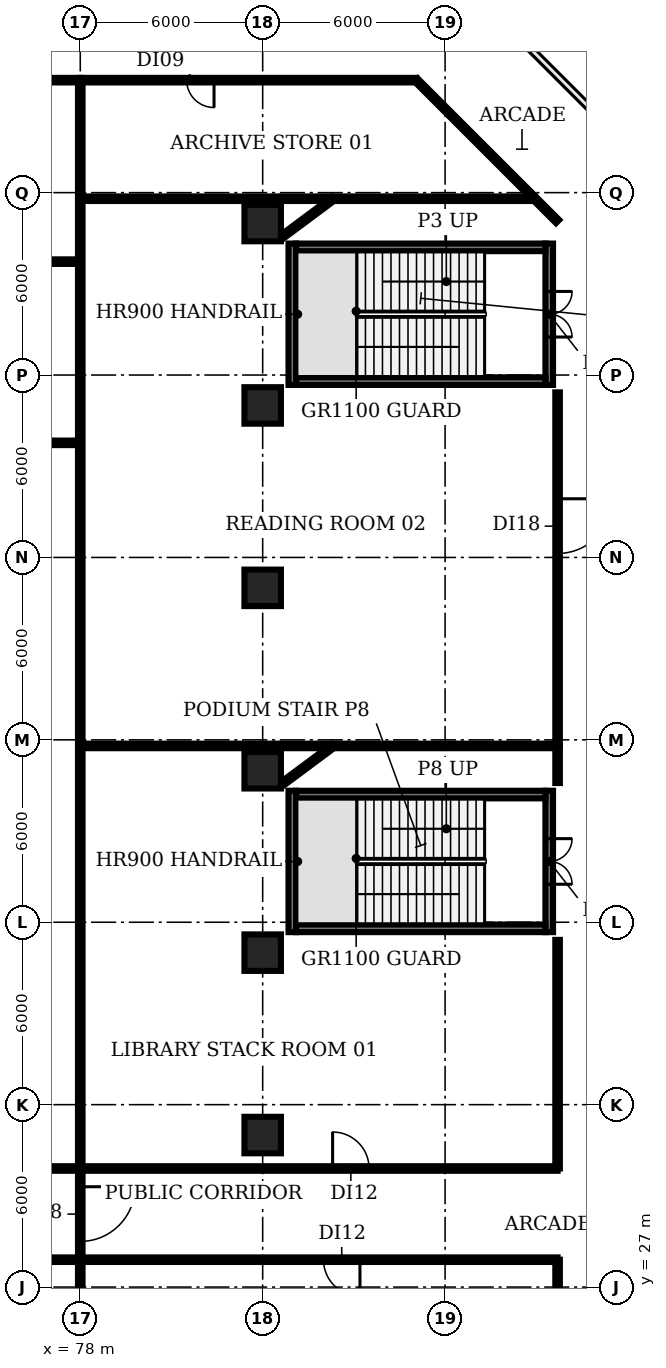
"""IFC4 building model, lengths in metres.
Left out: names, types, materials, properties, quantities, classifications, styles, units other than length and angle.
Written with IfcOpenShell. Run it as: python <this file> out.ifc"""

import sys

from ifc_helpers import new_model, si_unit, direction, frame, frame_2d, origin, origin_2d, place, context, subcontext, project, spatial, rectangle, extrude, element, fill, save


model = new_model("IFC4")
c1 = context("Model", 3, precision=1e-05, world=origin(), true_north=direction((0.0, 1.0)))
c2 = subcontext(c1, "Body", "Model", "MODEL_VIEW")
j1 = project(units=[si_unit("LENGTHUNIT", "METRE"), si_unit("PLANEANGLEUNIT", "RADIAN")], contexts=[c1])
p1 = place(None, origin())
s1 = spatial("IfcSite", under=j1, at=p1, CompositionType="ELEMENT")
p2 = place(p1, origin())
s2 = spatial("IfcBuilding", under=s1, at=p2, CompositionType="ELEMENT")
p3 = place(p2, origin())
s3 = spatial("IfcBuildingStorey", under=s2, at=p3, CompositionType="ELEMENT", Elevation=0.0)
for number, where, z_axis, x_axis in (
    (1, (84.0, 32.0, 0.0), (0.0, 0.0, 1.0), (1.0, 0.0, 0.0)),
    (2, (84.0, 38.0, 0.0), (0.0, 0.0, 1.0), (1.0, 0.0, 0.0)),
    (3, (84.0, 44.0, 0.0), (0.0, 0.0, 1.0), (1.0, 0.0, 0.0)),
    (4, (84.0, 50.0, 0.0), (0.0, 0.0, 1.0), (1.0, 0.0, 0.0)),
    (5, (84.0, 56.0, 0.0), (0.0, 0.0, 1.0), (1.0, 0.0, 0.0)),
    (6, (84.0, 62.0, 0.0), (0.0, 0.0, 1.0), (1.0, 0.0, 0.0)),
):
    element("IfcColumn", number, at=place(p3, frame(where, z_axis=z_axis, x_axis=x_axis)), inside=s3, PredefinedType="COLUMN", context=c2, shape_type="SweptSolid", body=[
        extrude(rectangle(XDim=1.2, YDim=1.2, at=origin_2d()), origin(), (0.0, 0.0, 1.0), 5.65),
    ])
p4 = place(p3, frame((84.975, 56.675, 0.0), z_axis=(0.0, 0.0, 1.0), x_axis=(0.0, 1.0, 0.0)))
e7 = element("IfcWall", 7, at=p4, inside=s3, PredefinedType="SHEAR", context=c2, shape_type="SweptSolid", body=[
    extrude(rectangle(XDim=4.65, YDim=0.25, at=frame_2d((2.325, 0.0))), origin(), (0.0, 0.0, 1.0), 5.65),
])
p5 = place(p3, frame((93.425, 61.325, 0.0), z_axis=(0.0, 0.0, 1.0), x_axis=(0.0, -1.0, 0.0)))
e8 = element("IfcWall", 8, at=p5, inside=s3, PredefinedType="SHEAR", context=c2, shape_type="SweptSolid", body=[
    extrude(rectangle(XDim=4.65, YDim=0.25, at=frame_2d((2.325, 0.0))), origin(), (0.0, 0.0, 1.0), 5.65),
])
p6 = place(p5, frame((1.575, 0.0, 0.0)))
e9 = element("IfcOpeningElement", 9, at=p6, cuts=e8, PredefinedType="OPENING", context=c2, shape_type="SweptSolid", body=[
    extrude(rectangle(XDim=1.5, YDim=2.1, at=frame_2d((0.75, 1.05))), frame((0.0, 0.135, 0.0), z_axis=(0.0, -1.0, 0.0), x_axis=(1.0, 0.0, 0.0)), (0.0, 0.0, 1.0), 0.27),
])
for number, where, z_axis, x_axis in (
    (10, (85.1, 56.8, 0.0), (0.0, 0.0, 1.0), (1.0, 0.0, 0.0)),
    (11, (85.1, 61.2, 0.0), (0.0, 0.0, 1.0), (1.0, 0.0, 0.0)),
):
    element("IfcWall", number, at=place(p3, frame(where, z_axis=z_axis, x_axis=x_axis)), inside=s3, PredefinedType="SHEAR", context=c2, shape_type="SweptSolid", body=[
        extrude(rectangle(XDim=8.2, YDim=0.25, at=frame_2d((4.1, 0.0))), origin(), (0.0, 0.0, 1.0), 5.65),
    ])
p7 = place(p3, frame((84.975, 38.675, 0.0), z_axis=(0.0, 0.0, 1.0), x_axis=(0.0, 1.0, 0.0)))
e12 = element("IfcWall", 12, at=p7, inside=s3, PredefinedType="SHEAR", context=c2, shape_type="SweptSolid", body=[
    extrude(rectangle(XDim=4.65, YDim=0.25, at=frame_2d((2.325, 0.0))), origin(), (0.0, 0.0, 1.0), 5.65),
])
p8 = place(p3, frame((93.425, 43.325, 0.0), z_axis=(0.0, 0.0, 1.0), x_axis=(0.0, -1.0, 0.0)))
e13 = element("IfcWall", 13, at=p8, inside=s3, PredefinedType="SHEAR", context=c2, shape_type="SweptSolid", body=[
    extrude(rectangle(XDim=4.65, YDim=0.25, at=frame_2d((2.325, 0.0))), origin(), (0.0, 0.0, 1.0), 5.65),
])
p9 = place(p8, frame((1.575, 0.0, 0.0)))
e14 = element("IfcOpeningElement", 14, at=p9, cuts=e13, PredefinedType="OPENING", context=c2, shape_type="SweptSolid", body=[
    extrude(rectangle(XDim=1.5, YDim=2.1, at=frame_2d((0.75, 1.05))), frame((0.0, 0.135, 0.0), z_axis=(0.0, -1.0, 0.0), x_axis=(1.0, 0.0, 0.0)), (0.0, 0.0, 1.0), 0.27),
])
for number, where, z_axis, x_axis in (
    (15, (85.1, 38.8, 0.0), (0.0, 0.0, 1.0), (1.0, 0.0, 0.0)),
    (16, (85.1, 43.2, 0.0), (0.0, 0.0, 1.0), (1.0, 0.0, 0.0)),
):
    element("IfcWall", number, at=place(p3, frame(where, z_axis=z_axis, x_axis=x_axis)), inside=s3, PredefinedType="SHEAR", context=c2, shape_type="SweptSolid", body=[
        extrude(rectangle(XDim=8.2, YDim=0.25, at=frame_2d((4.1, 0.0))), origin(), (0.0, 0.0, 1.0), 5.65),
    ])
for number, where, z_axis, x_axis in (
    (17, (67.8, 27.9, 0.0), (0.0, 0.0, 1.0), (1.0, 0.0, 0.0)),
    (18, (67.8, 30.9, 0.0), (0.0, 0.0, 1.0), (1.0, 0.0, 0.0)),
    (19, (67.8, 54.77, 0.0), (0.0, 0.0, 1.0), (1.0, 0.0, 0.0)),
    (20, (67.8, 60.73, 0.0), (0.0, 0.0, 1.0), (1.0, 0.0, 0.0)),
):
    element("IfcWall", number, at=place(p3, frame(where, z_axis=z_axis, x_axis=x_axis)), inside=s3, PredefinedType="PARTITIONING", context=c2, shape_type="SweptSolid", body=[
        extrude(rectangle(XDim=10.2, YDim=0.15, at=frame_2d((5.1, 0.0))), origin(), (0.0, 0.0, 1.0), 4.53),
    ])
p10 = place(p3, frame((78.0, -3.92, 0.0), z_axis=(0.0, 0.0, 1.0), x_axis=(0.0, 1.0, 0.0)))
e21 = element("IfcWall", 21, at=p10, inside=s3, PredefinedType="PARTITIONING", context=c2, shape_type="SweptSolid", body=[
    extrude(rectangle(XDim=31.82, YDim=0.15, at=frame_2d((15.91, 0.0))), origin(), (0.0, 0.0, 1.0), 4.53),
])
p11 = place(p3, frame((78.0, 30.9, 0.0), z_axis=(0.0, 0.0, 1.0), x_axis=(0.0, -1.0, 0.0)))
e22 = element("IfcWall", 22, at=p11, inside=s3, PredefinedType="PARTITIONING", context=c2, shape_type="SweptSolid", body=[
    extrude(rectangle(XDim=3.0, YDim=0.15, at=frame_2d((1.5, 0.0))), origin(), (0.0, 0.0, 1.0), 4.53),
])
p12 = place(p11, frame((0.6, 0.0, 0.0)))
e23 = element("IfcOpeningElement", 23, at=p12, cuts=e22, PredefinedType="OPENING", context=c2, shape_type="SweptSolid", body=[
    extrude(rectangle(XDim=1.8, YDim=2.1, at=frame_2d((0.9, 1.05))), frame((0.0, 0.085, 0.0), z_axis=(0.0, -1.0, 0.0), x_axis=(1.0, 0.0, 0.0)), (0.0, 0.0, 1.0), 0.17),
])
p13 = place(p3, frame((78.0, 30.9, 0.0), z_axis=(0.0, 0.0, 1.0), x_axis=(0.0, 1.0, 0.0)))
e24 = element("IfcWall", 24, at=p13, inside=s3, PredefinedType="PARTITIONING", context=c2, shape_type="SweptSolid", body=[
    extrude(rectangle(XDim=35.8, YDim=0.15, at=frame_2d((17.9, 0.0))), origin(), (0.0, 0.0, 1.0), 4.53),
])
p14 = place(p3, frame((78.0, 30.9, 0.0), z_axis=(0.0, 0.0, 1.0), x_axis=(1.0, 0.0, 0.0)))
e25 = element("IfcWall", 25, at=p14, inside=s3, PredefinedType="PARTITIONING", context=c2, shape_type="SweptSolid", body=[
    extrude(rectangle(XDim=15.7, YDim=0.15, at=frame_2d((7.85, 0.0))), origin(), (0.0, 0.0, 1.0), 4.53),
])
p15 = place(p14, frame((8.3, 0.0, 0.0)))
e26 = element("IfcOpeningElement", 26, at=p15, cuts=e25, PredefinedType="OPENING", context=c2, shape_type="SweptSolid", body=[
    extrude(rectangle(XDim=1.2, YDim=2.1, at=frame_2d((0.6, 1.05))), frame((0.0, 0.085, 0.0), z_axis=(0.0, -1.0, 0.0), x_axis=(1.0, 0.0, 0.0)), (0.0, 0.0, 1.0), 0.17),
])
p16 = place(p3, frame((78.0, 44.8, 0.0), z_axis=(0.0, 0.0, 1.0), x_axis=(1.0, 0.0, 0.0)))
e27 = element("IfcWall", 27, at=p16, inside=s3, PredefinedType="PARTITIONING", context=c2, shape_type="SweptSolid", body=[
    extrude(rectangle(XDim=15.7, YDim=0.15, at=frame_2d((7.85, 0.0))), origin(), (0.0, 0.0, 1.0), 4.53),
])
p17 = place(p3, frame((78.0, 62.8, 0.0), z_axis=(0.0, 0.0, 1.0), x_axis=(1.0, 0.0, 0.0)))
e28 = element("IfcWall", 28, at=p17, inside=s3, PredefinedType="PARTITIONING", context=c2, shape_type="SweptSolid", body=[
    extrude(rectangle(XDim=14.95, YDim=0.15, at=frame_2d((7.475, 0.0))), origin(), (0.0, 0.0, 1.0), 4.53),
])
p18 = place(p3, frame((78.0, 66.7, 0.0), z_axis=(0.0, 0.0, 1.0), x_axis=(-1.0, 0.0, 0.0)))
e29 = element("IfcWall", 29, at=p18, inside=s3, PredefinedType="PARTITIONING", context=c2, shape_type="SweptSolid", body=[
    extrude(rectangle(XDim=10.2, YDim=0.15, at=frame_2d((5.1, 0.0))), origin(), (0.0, 0.0, 1.0), 4.53),
])
p19 = place(p18, frame((3.3, 0.0, 0.0)))
e30 = element("IfcOpeningElement", 30, at=p19, cuts=e29, PredefinedType="OPENING", context=c2, shape_type="SweptSolid", body=[
    extrude(rectangle(XDim=1.0, YDim=2.1, at=frame_2d((0.5, 1.05))), frame((0.0, 0.085, 0.0), z_axis=(0.0, -1.0, 0.0), x_axis=(1.0, 0.0, 0.0)), (0.0, 0.0, 1.0), 0.17),
])
for number, where, z_axis, x_axis in (
    (31, (84.64, 43.55, 0.0), (0.0, 0.0, 1.0), (0.802, 0.597, 0.0)),
    (32, (84.64, 61.55, 0.0), (0.0, 0.0, 1.0), (0.802, 0.597, 0.0)),
):
    element("IfcWall", number, at=place(p3, frame(where, z_axis=z_axis, x_axis=x_axis)), inside=s3, PredefinedType="PARTITIONING", context=c2, shape_type="SweptSolid", body=[
        extrude(rectangle(XDim=2.094, YDim=0.15, at=frame_2d((1.047, 0.0))), origin(), (0.0, 0.0, 1.0), 4.53),
    ])
p20 = place(p3, frame((89.05, 66.7, 0.0), z_axis=(0.0, 0.0, 1.0), x_axis=(-1.0, 0.0, 0.0)))
e33 = element("IfcWall", 33, at=p20, inside=s3, PredefinedType="PARTITIONING", context=c2, shape_type="SweptSolid", body=[
    extrude(rectangle(XDim=11.05, YDim=0.15, at=frame_2d((5.525, 0.0))), origin(), (0.0, 0.0, 1.0), 4.53),
])
p21 = place(p20, frame((6.65, 0.0, 0.0)))
e34 = element("IfcOpeningElement", 34, at=p21, cuts=e33, PredefinedType="OPENING", context=c2, shape_type="SweptSolid", body=[
    extrude(rectangle(XDim=0.9, YDim=2.1, at=frame_2d((0.45, 1.05))), frame((0.0, 0.085, 0.0), z_axis=(0.0, -1.0, 0.0), x_axis=(1.0, 0.0, 0.0)), (0.0, 0.0, 1.0), 0.17),
])
p22 = place(p3, frame((89.05, 66.7, 0.0), z_axis=(0.0, 0.0, 1.0), x_axis=(0.707106781187, -0.707106781187, 0.0)))
e35 = element("IfcWall", 35, at=p22, inside=s3, PredefinedType="PARTITIONING", context=c2, shape_type="SweptSolid", body=[
    extrude(rectangle(XDim=6.576, YDim=0.15, at=frame_2d((3.288, 0.0))), origin(), (0.0, 0.0, 1.0), 4.53),
])
p23 = place(p3, frame((93.7, 19.58, 0.0), z_axis=(0.0, 0.0, 1.0), x_axis=(0.0, 1.0, 0.0)))
e36 = element("IfcWall", 36, at=p23, inside=s3, PredefinedType="PARTITIONING", context=c2, shape_type="SweptSolid", body=[
    extrude(rectangle(XDim=8.32, YDim=0.15, at=frame_2d((4.16, 0.0))), origin(), (0.0, 0.0, 1.0), 4.53),
])
p24 = place(p3, frame((93.7, 27.9, 0.0), z_axis=(0.0, 0.0, 1.0), x_axis=(-1.0, 0.0, 0.0)))
e37 = element("IfcWall", 37, at=p24, inside=s3, PredefinedType="PARTITIONING", context=c2, shape_type="SweptSolid", body=[
    extrude(rectangle(XDim=15.7, YDim=0.15, at=frame_2d((7.85, 0.0))), origin(), (0.0, 0.0, 1.0), 4.53),
])
p25 = place(p24, frame((6.5, 0.0, 0.0)))
e38 = element("IfcOpeningElement", 38, at=p25, cuts=e37, PredefinedType="OPENING", context=c2, shape_type="SweptSolid", body=[
    extrude(rectangle(XDim=1.2, YDim=2.1, at=frame_2d((0.6, 1.05))), frame((0.0, 0.085, 0.0), z_axis=(0.0, -1.0, 0.0), x_axis=(1.0, 0.0, 0.0)), (0.0, 0.0, 1.0), 0.17),
])
p26 = place(p3, frame((93.7, 30.9, 0.0), z_axis=(0.0, 0.0, 1.0), x_axis=(0.0, 1.0, 0.0)))
e39 = element("IfcWall", 39, at=p26, inside=s3, PredefinedType="PARTITIONING", context=c2, shape_type="SweptSolid", body=[
    extrude(rectangle(XDim=7.52, YDim=0.15, at=frame_2d((3.76, 0.0))), origin(), (0.0, 0.0, 1.0), 4.53),
])
p27 = place(p3, frame((93.7, 43.58, 0.0), z_axis=(0.0, 0.0, 1.0), x_axis=(0.0, 1.0, 0.0)))
e40 = element("IfcWall", 40, at=p27, inside=s3, PredefinedType="PARTITIONING", context=c2, shape_type="SweptSolid", body=[
    extrude(rectangle(XDim=1.22, YDim=0.15, at=frame_2d((0.61, 0.0))), origin(), (0.0, 0.0, 1.0), 4.53),
])
p28 = place(p3, frame((93.7, 56.43, 0.0), z_axis=(0.0, 0.0, 1.0), x_axis=(0.0, -1.0, 0.0)))
e41 = element("IfcWall", 41, at=p28, inside=s3, PredefinedType="PARTITIONING", context=c2, shape_type="SweptSolid", body=[
    extrude(rectangle(XDim=11.63, YDim=0.15, at=frame_2d((5.815, 0.0))), origin(), (0.0, 0.0, 1.0), 4.53),
])
p29 = place(p28, frame((3.5, 0.0, 0.0)))
e42 = element("IfcOpeningElement", 42, at=p29, cuts=e41, PredefinedType="OPENING", context=c2, shape_type="SweptSolid", body=[
    extrude(rectangle(XDim=1.8, YDim=2.1, at=frame_2d((0.9, 1.05))), frame((0.0, 0.085, 0.0), z_axis=(0.0, -1.0, 0.0), x_axis=(1.0, 0.0, 0.0)), (0.0, 0.0, 1.0), 0.17),
])
p30 = place(p6, origin())
e43 = element("IfcDoor", 43, at=p30, inside=s3, OperationType="DOUBLE_DOOR_SINGLE_SWING", PredefinedType="DOOR", context=c2, shape_type="SweptSolid", body=[
    extrude(rectangle(XDim=1.5, YDim=2.1, at=frame_2d((0.75, 1.05))), frame((0.0, 0.025, 0.0), z_axis=(0.0, -1.0, 0.0), x_axis=(1.0, 0.0, 0.0)), (0.0, 0.0, 1.0), 0.05),
])
fill(e9, e43)
p31 = place(p9, origin())
e44 = element("IfcDoor", 44, at=p31, inside=s3, OperationType="DOUBLE_DOOR_SINGLE_SWING", PredefinedType="DOOR", context=c2, shape_type="SweptSolid", body=[
    extrude(rectangle(XDim=1.5, YDim=2.1, at=frame_2d((0.75, 1.05))), frame((0.0, 0.025, 0.0), z_axis=(0.0, -1.0, 0.0), x_axis=(1.0, 0.0, 0.0)), (0.0, 0.0, 1.0), 0.05),
])
fill(e14, e44)
p32 = place(p12, origin())
e45 = element("IfcDoor", 45, at=p32, inside=s3, OperationType="SINGLE_SWING_LEFT", PredefinedType="DOOR", context=c2, shape_type="SweptSolid", body=[
    extrude(rectangle(XDim=1.8, YDim=2.1, at=frame_2d((0.9, 1.05))), frame((0.0, 0.025, 0.0), z_axis=(0.0, -1.0, 0.0), x_axis=(1.0, 0.0, 0.0)), (0.0, 0.0, 1.0), 0.05),
])
fill(e23, e45)
p33 = place(p15, origin())
e46 = element("IfcDoor", 46, at=p33, inside=s3, OperationType="SINGLE_SWING_LEFT", PredefinedType="DOOR", context=c2, shape_type="SweptSolid", body=[
    extrude(rectangle(XDim=1.2, YDim=2.1, at=frame_2d((0.6, 1.05))), frame((0.0, 0.025, 0.0), z_axis=(0.0, -1.0, 0.0), x_axis=(1.0, 0.0, 0.0)), (0.0, 0.0, 1.0), 0.05),
])
fill(e26, e46)
p34 = place(p21, origin())
e47 = element("IfcDoor", 47, at=p34, inside=s3, OperationType="SINGLE_SWING_LEFT", PredefinedType="DOOR", context=c2, shape_type="SweptSolid", body=[
    extrude(rectangle(XDim=0.9, YDim=2.1, at=frame_2d((0.45, 1.05))), frame((0.0, 0.025, 0.0), z_axis=(0.0, -1.0, 0.0), x_axis=(1.0, 0.0, 0.0)), (0.0, 0.0, 1.0), 0.05),
])
fill(e34, e47)
p35 = place(p25, origin())
e48 = element("IfcDoor", 48, at=p35, inside=s3, OperationType="SINGLE_SWING_LEFT", PredefinedType="DOOR", context=c2, shape_type="SweptSolid", body=[
    extrude(rectangle(XDim=1.2, YDim=2.1, at=frame_2d((0.6, 1.05))), frame((0.0, 0.025, 0.0), z_axis=(0.0, -1.0, 0.0), x_axis=(1.0, 0.0, 0.0)), (0.0, 0.0, 1.0), 0.05),
])
fill(e38, e48)
p36 = place(p29, origin())
e49 = element("IfcDoor", 49, at=p36, inside=s3, OperationType="SINGLE_SWING_LEFT", PredefinedType="DOOR", context=c2, shape_type="SweptSolid", body=[
    extrude(rectangle(XDim=1.8, YDim=2.1, at=frame_2d((0.9, 1.05))), frame((0.0, 0.025, 0.0), z_axis=(0.0, -1.0, 0.0), x_axis=(1.0, 0.0, 0.0)), (0.0, 0.0, 1.0), 0.05),
])
fill(e42, e49)
save(model, sys.argv[1])
